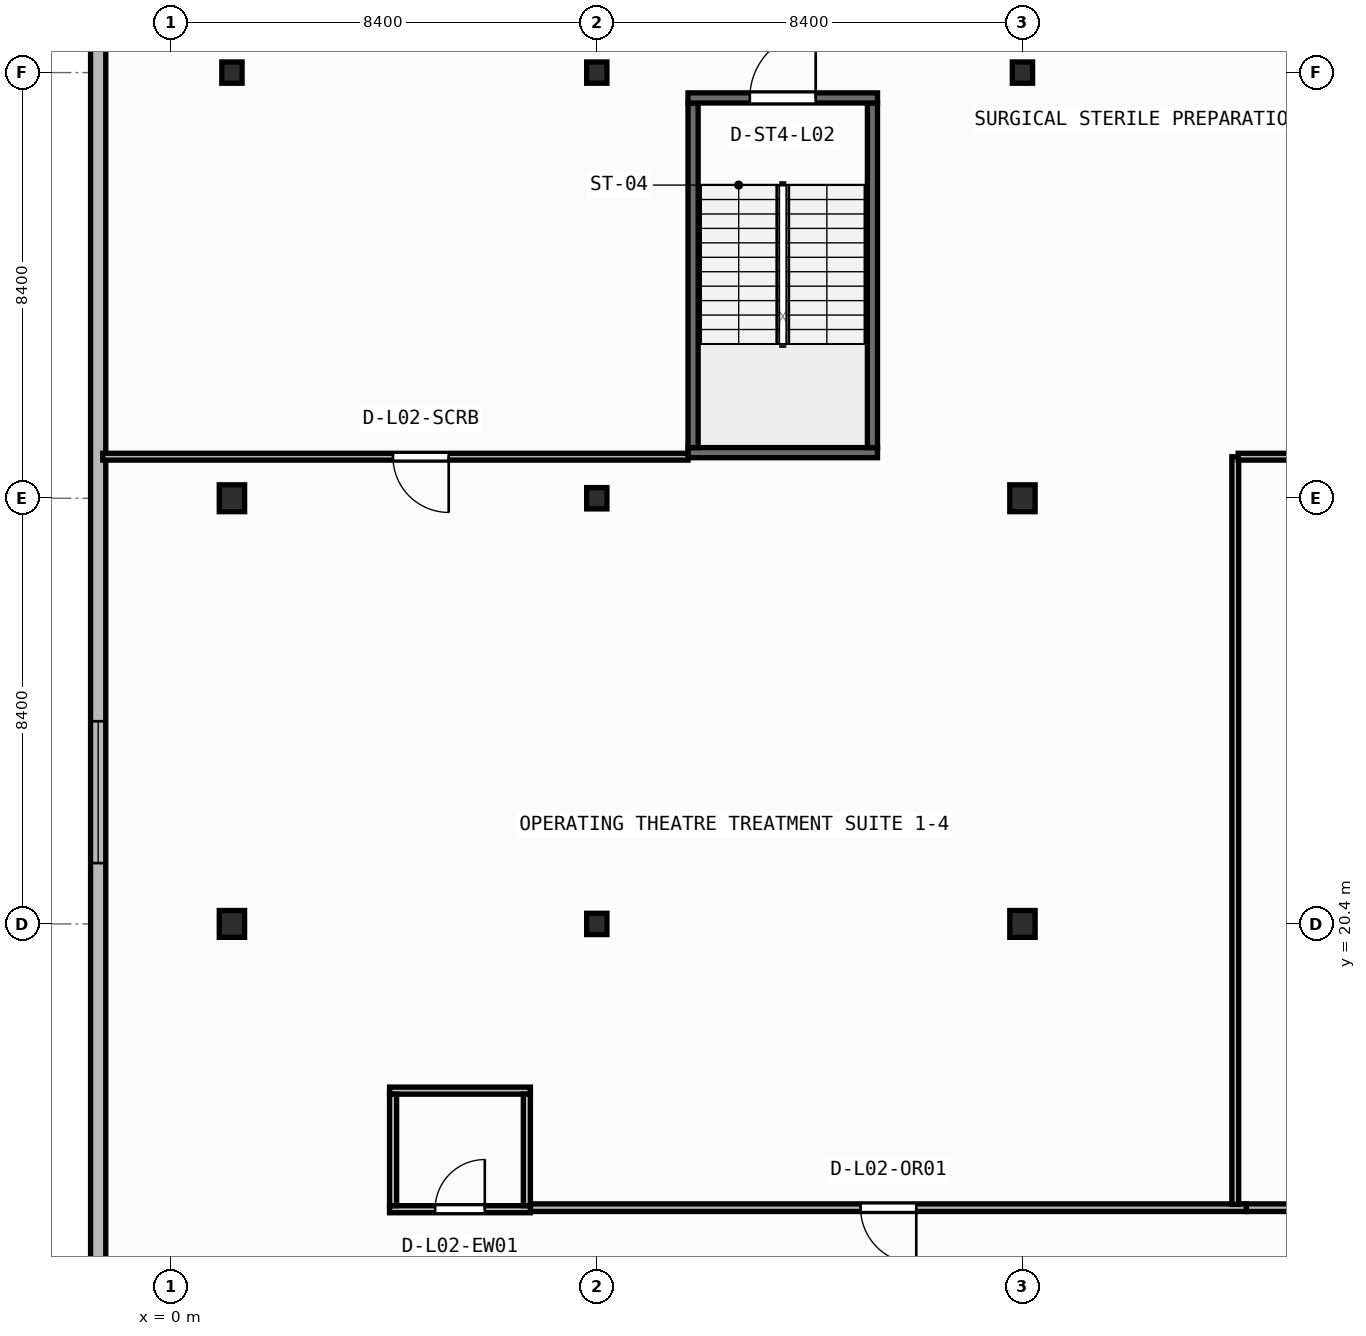
"""IFC4 building model, lengths in metres.
Left out: names, types, materials, properties, quantities, classifications, styles, units other than length and angle.
Written with IfcOpenShell. Run it as: python <this file> out.ifc"""

import sys

from ifc_helpers import new_model, si_unit, direction, frame, frame_2d, origin, origin_2d, place, context, subcontext, project, spatial, rectangle, i_section, extrude, element, fill, save


model = new_model("IFC4")
c1 = context("Model", 3, precision=1e-05, world=origin(), true_north=direction((0.0, 1.0)))
c2 = subcontext(c1, "Body", "Model", "MODEL_VIEW")
j1 = project(units=[si_unit("LENGTHUNIT", "METRE"), si_unit("PLANEANGLEUNIT", "RADIAN")], contexts=[c1])
p1 = place(None, origin())
s1 = spatial("IfcSite", under=j1, at=p1, CompositionType="ELEMENT")
p2 = place(p1, origin())
s2 = spatial("IfcBuilding", under=s1, at=p2, CompositionType="ELEMENT")
p3 = place(p2, frame((0.0, 0.0, 9.0)))
s3 = spatial("IfcBuildingStorey", under=s2, at=p3, CompositionType="ELEMENT", Elevation=9.0)
p4 = place(p3, frame((1.2, 20.4, 0.0), z_axis=(0.0, 0.0, 1.0), x_axis=(1.0, 0.0, 0.0)))
e1 = element("IfcColumn", 1, at=p4, inside=s3, PredefinedType="COLUMN", context=c2, shape_type="SweptSolid", body=[
    extrude(i_section(OverallWidth=0.5, OverallDepth=0.53, WebThickness=0.028, FlangeThickness=0.045, at=origin_2d()), origin(), (0.0, 0.0, 1.0), 4.5),
])
p5 = place(p3, frame((8.4, 20.4, 0.0), z_axis=(0.0, 0.0, 1.0), x_axis=(1.0, 0.0, 0.0)))
e2 = element("IfcColumn", 2, at=p5, inside=s3, PredefinedType="COLUMN", context=c2, shape_type="SweptSolid", body=[
    extrude(i_section(OverallWidth=0.4, OverallDepth=0.42, WebThickness=0.025, FlangeThickness=0.04, at=origin_2d()), origin(), (0.0, 0.0, 1.0), 4.5),
])
for number, where, z_axis, x_axis in (
    (3, (16.8, 20.4, 0.0), (0.0, 0.0, 1.0), (1.0, 0.0, 0.0)),
    (4, (1.2, 28.8, 0.0), (0.0, 0.0, 1.0), (1.0, 0.0, 0.0)),
):
    element("IfcColumn", number, at=place(p3, frame(where, z_axis=z_axis, x_axis=x_axis)), inside=s3, PredefinedType="COLUMN", context=c2, shape_type="SweptSolid", body=[
        extrude(i_section(OverallWidth=0.5, OverallDepth=0.53, WebThickness=0.028, FlangeThickness=0.045, at=origin_2d()), origin(), (0.0, 0.0, 1.0), 4.5),
    ])
p6 = place(p3, frame((8.4, 28.8, 0.0), z_axis=(0.0, 0.0, 1.0), x_axis=(1.0, 0.0, 0.0)))
e5 = element("IfcColumn", 5, at=p6, inside=s3, PredefinedType="COLUMN", context=c2, shape_type="SweptSolid", body=[
    extrude(i_section(OverallWidth=0.4, OverallDepth=0.42, WebThickness=0.025, FlangeThickness=0.04, at=origin_2d()), origin(), (0.0, 0.0, 1.0), 4.5),
])
p7 = place(p3, frame((16.8, 28.8, 0.0), z_axis=(0.0, 0.0, 1.0), x_axis=(1.0, 0.0, 0.0)))
e6 = element("IfcColumn", 6, at=p7, inside=s3, PredefinedType="COLUMN", context=c2, shape_type="SweptSolid", body=[
    extrude(i_section(OverallWidth=0.5, OverallDepth=0.53, WebThickness=0.028, FlangeThickness=0.045, at=origin_2d()), origin(), (0.0, 0.0, 1.0), 4.5),
])
for number, where, z_axis, x_axis in (
    (7, (1.2, 37.2, 0.0), (0.0, 0.0, 1.0), (1.0, 0.0, 0.0)),
    (8, (8.4, 37.2, 0.0), (0.0, 0.0, 1.0), (1.0, 0.0, 0.0)),
    (9, (16.8, 37.2, 0.0), (0.0, 0.0, 1.0), (1.0, 0.0, 0.0)),
):
    element("IfcColumn", number, at=place(p3, frame(where, z_axis=z_axis, x_axis=x_axis)), inside=s3, PredefinedType="COLUMN", context=c2, shape_type="SweptSolid", body=[
        extrude(i_section(OverallWidth=0.4, OverallDepth=0.42, WebThickness=0.025, FlangeThickness=0.04, at=origin_2d()), origin(), (0.0, 0.0, 1.0), 4.5),
    ])
p8 = place(p3, frame((-1.44, 45.24, 0.0), z_axis=(0.0, 0.0, 1.0), x_axis=(0.0, -1.0, 0.0)))
e10 = element("IfcWall", 10, at=p8, inside=s3, PredefinedType="STANDARD", context=c2, shape_type="SweptSolid", body=[
    extrude(rectangle(XDim=44.48, YDim=0.3, at=frame_2d((22.24, 0.0))), origin(), (0.0, 0.0, 1.0), 4.25),
])
p9 = place(p8, frame((20.84, 0.0, 0.85)))
e11 = element("IfcOpeningElement", 11, at=p9, cuts=e10, PredefinedType="OPENING", context=c2, shape_type="SweptSolid", body=[
    extrude(rectangle(XDim=2.8, YDim=2.1, at=frame_2d((1.4, 1.05))), frame((0.0, 0.16, 0.0), z_axis=(0.0, -1.0, 0.0), x_axis=(1.0, 0.0, 0.0)), (0.0, 0.0, 1.0), 0.32),
])
p10 = place(p3, frame((10.2, 29.7, 0.0), z_axis=(0.0, 0.0, 1.0), x_axis=(1.0, 0.0, 0.0)))
e12 = element("IfcWall", 12, at=p10, inside=s3, PredefinedType="SHEAR", context=c2, shape_type="SweptSolid", body=[
    extrude(rectangle(XDim=3.74, YDim=0.2, at=frame_2d((1.87, 0.0))), origin(), (0.0, 0.0, 1.0), 4.25),
])
for number, where, z_axis, x_axis in (
    (13, (10.3, 29.8, 0.0), (0.0, 0.0, 1.0), (0.0, 1.0, 0.0)),
    (14, (13.84, 29.8, 0.0), (0.0, 0.0, 1.0), (0.0, 1.0, 0.0)),
):
    element("IfcWall", number, at=place(p3, frame(where, z_axis=z_axis, x_axis=x_axis)), inside=s3, PredefinedType="SHEAR", context=c2, shape_type="SweptSolid", body=[
        extrude(rectangle(XDim=6.8, YDim=0.2, at=frame_2d((3.4, 0.0))), origin(), (0.0, 0.0, 1.0), 4.25),
    ])
p11 = place(p3, frame((10.2, 36.7, 0.0), z_axis=(0.0, 0.0, 1.0), x_axis=(1.0, 0.0, 0.0)))
e15 = element("IfcWall", 15, at=p11, inside=s3, PredefinedType="SHEAR", context=c2, shape_type="SweptSolid", body=[
    extrude(rectangle(XDim=3.74, YDim=0.2, at=frame_2d((1.87, 0.0))), origin(), (0.0, 0.0, 1.0), 4.25),
])
p12 = place(p11, frame((1.22, 0.0, 0.0)))
e16 = element("IfcOpeningElement", 16, at=p12, cuts=e15, PredefinedType="OPENING", context=c2, shape_type="SweptSolid", body=[
    extrude(rectangle(XDim=1.3, YDim=2.15, at=frame_2d((0.65, 1.075))), frame((0.0, 0.11, 0.0), z_axis=(0.0, -1.0, 0.0), x_axis=(1.0, 0.0, 0.0)), (0.0, 0.0, 1.0), 0.22),
])
p13 = place(p3, frame((4.31, 14.77, 0.0), z_axis=(0.0, 0.0, 1.0), x_axis=(1.0, 0.0, 0.0)))
e17 = element("IfcWall", 17, at=p13, inside=s3, PredefinedType="PARTITIONING", context=c2, shape_type="SweptSolid", body=[
    extrude(rectangle(XDim=2.78, YDim=0.14, at=frame_2d((1.39, 0.0))), origin(), (0.0, 0.0, 1.0), 4.25),
])
p14 = place(p13, frame((0.9, 0.0, 0.0)))
e18 = element("IfcOpeningElement", 18, at=p14, cuts=e17, PredefinedType="OPENING", context=c2, shape_type="SweptSolid", body=[
    extrude(rectangle(XDim=0.98, YDim=2.1, at=frame_2d((0.49, 1.05))), frame((0.0, 0.08, 0.0), z_axis=(0.0, -1.0, 0.0), x_axis=(1.0, 0.0, 0.0)), (0.0, 0.0, 1.0), 0.16),
])
p15 = place(p3, frame((4.31, 17.11, 0.0), z_axis=(0.0, 0.0, 1.0), x_axis=(1.0, 0.0, 0.0)))
e19 = element("IfcWall", 19, at=p15, inside=s3, PredefinedType="PARTITIONING", context=c2, shape_type="SweptSolid", body=[
    extrude(rectangle(XDim=2.78, YDim=0.14, at=frame_2d((1.39, 0.0))), origin(), (0.0, 0.0, 1.0), 4.25),
])
for number, where, z_axis, x_axis in (
    (20, (4.38, 14.84, 0.0), (0.0, 0.0, 1.0), (0.0, 1.0, 0.0)),
    (21, (7.02, 14.84, 0.0), (0.0, 0.0, 1.0), (0.0, 1.0, 0.0)),
):
    element("IfcWall", number, at=place(p3, frame(where, z_axis=z_axis, x_axis=x_axis)), inside=s3, PredefinedType="PARTITIONING", context=c2, shape_type="SweptSolid", body=[
        extrude(rectangle(XDim=2.2, YDim=0.14, at=frame_2d((1.1, 0.0))), origin(), (0.0, 0.0, 1.0), 4.25),
    ])
p16 = place(p3, frame((21.218, 14.8, 0.0), z_axis=(0.0, 0.0, 1.0), x_axis=(-1.0, 0.0, 0.0)))
e22 = element("IfcWall", 22, at=p16, inside=s3, PredefinedType="PARTITIONING", context=c2, shape_type="SweptSolid", body=[
    extrude(rectangle(XDim=14.126, YDim=0.15, at=frame_2d((7.063, 0.0))), origin(), (0.0, 0.0, 1.0), 4.25),
])
p17 = place(p16, frame((6.513, 0.0, 0.0)))
e23 = element("IfcOpeningElement", 23, at=p17, cuts=e22, PredefinedType="OPENING", context=c2, shape_type="SweptSolid", body=[
    extrude(rectangle(XDim=1.1, YDim=2.1, at=frame_2d((0.55, 1.05))), frame((0.0, 0.085, 0.0), z_axis=(0.0, -1.0, 0.0), x_axis=(1.0, 0.0, 0.0)), (0.0, 0.0, 1.0), 0.17),
])
p18 = place(p3, frame((44.218, 14.8, 0.0), z_axis=(0.0, 0.0, 1.0), x_axis=(-1.0, 0.0, 0.0)))
e24 = element("IfcWall", 24, at=p18, inside=s3, PredefinedType="PARTITIONING", context=c2, shape_type="SweptSolid", body=[
    extrude(rectangle(XDim=22.998, YDim=0.15, at=frame_2d((11.499, 0.0))), origin(), (0.0, 0.0, 1.0), 4.25),
])
p19 = place(p18, frame((10.949, 0.0, 0.0)))
e25 = element("IfcOpeningElement", 25, at=p19, cuts=e24, PredefinedType="OPENING", context=c2, shape_type="SweptSolid", body=[
    extrude(rectangle(XDim=1.1, YDim=2.1, at=frame_2d((0.55, 1.05))), frame((0.0, 0.085, 0.0), z_axis=(0.0, -1.0, 0.0), x_axis=(1.0, 0.0, 0.0)), (0.0, 0.0, 1.0), 0.17),
])
p20 = place(p3, frame((21.0, 14.865, 0.0), z_axis=(0.0, 0.0, 1.0), x_axis=(0.0, 1.0, 0.0)))
e26 = element("IfcWall", 26, at=p20, inside=s3, PredefinedType="PARTITIONING", context=c2, shape_type="SweptSolid", body=[
    extrude(rectangle(XDim=14.755, YDim=0.135, at=frame_2d((7.377, 0.0))), origin(), (0.0, 0.0, 1.0), 4.25),
])
p21 = place(p3, frame((10.2, 29.62, 0.0), z_axis=(0.0, 0.0, 1.0), x_axis=(-1.0, 0.0, 0.0)))
e27 = element("IfcWall", 27, at=p21, inside=s3, PredefinedType="PARTITIONING", context=c2, shape_type="SweptSolid", body=[
    extrude(rectangle(XDim=11.55, YDim=0.135, at=frame_2d((5.775, 0.0))), origin(), (0.0, 0.0, 1.0), 4.25),
])
p22 = place(p21, frame((4.722, 0.0, 0.0)))
e28 = element("IfcOpeningElement", 28, at=p22, cuts=e27, PredefinedType="OPENING", context=c2, shape_type="SweptSolid", body=[
    extrude(rectangle(XDim=1.1, YDim=2.1, at=frame_2d((0.55, 1.05))), frame((0.0, 0.077, 0.0), z_axis=(0.0, -1.0, 0.0), x_axis=(1.0, 0.0, 0.0)), (0.0, 0.0, 1.0), 0.155),
])
p23 = place(p3, frame((33.657, 29.62, 0.0), z_axis=(0.0, 0.0, 1.0), x_axis=(-1.0, 0.0, 0.0)))
e29 = element("IfcWall", 29, at=p23, inside=s3, PredefinedType="PARTITIONING", context=c2, shape_type="SweptSolid", body=[
    extrude(rectangle(XDim=12.6, YDim=0.135, at=frame_2d((6.3, 0.0))), origin(), (0.0, 0.0, 1.0), 4.25),
])
p24 = place(p9, origin())
e30 = element("IfcWindow", 30, at=p24, inside=s3, PartitioningType="SINGLE_PANEL", PredefinedType="WINDOW", context=c2, shape_type="SweptSolid", body=[
    extrude(rectangle(XDim=2.8, YDim=2.1, at=frame_2d((1.4, 1.05))), frame((0.0, 0.03, 0.0), z_axis=(0.0, -1.0, 0.0), x_axis=(1.0, 0.0, 0.0)), (0.0, 0.0, 1.0), 0.06),
])
fill(e11, e30)
p25 = place(p12, origin())
e31 = element("IfcDoor", 31, at=p25, inside=s3, OperationType="SINGLE_SWING_RIGHT", PredefinedType="DOOR", context=c2, shape_type="SweptSolid", body=[
    extrude(rectangle(XDim=1.3, YDim=2.15, at=frame_2d((0.65, 1.075))), frame((0.0, 0.025, 0.0), z_axis=(0.0, -1.0, 0.0), x_axis=(1.0, 0.0, 0.0)), (0.0, 0.0, 1.0), 0.05),
])
fill(e16, e31)
p26 = place(p14, origin())
e32 = element("IfcDoor", 32, at=p26, inside=s3, OperationType="SINGLE_SWING_RIGHT", PredefinedType="DOOR", context=c2, shape_type="SweptSolid", body=[
    extrude(rectangle(XDim=0.98, YDim=2.1, at=frame_2d((0.49, 1.05))), frame((0.0, 0.025, 0.0), z_axis=(0.0, -1.0, 0.0), x_axis=(1.0, 0.0, 0.0)), (0.0, 0.0, 1.0), 0.05),
])
fill(e18, e32)
p27 = place(p17, origin())
e33 = element("IfcDoor", 33, at=p27, inside=s3, OperationType="SINGLE_SWING_LEFT", PredefinedType="DOOR", context=c2, shape_type="SweptSolid", body=[
    extrude(rectangle(XDim=1.1, YDim=2.1, at=frame_2d((0.55, 1.05))), frame((0.0, 0.025, 0.0), z_axis=(0.0, -1.0, 0.0), x_axis=(1.0, 0.0, 0.0)), (0.0, 0.0, 1.0), 0.05),
])
fill(e23, e33)
p28 = place(p22, origin())
e34 = element("IfcDoor", 34, at=p28, inside=s3, OperationType="SINGLE_SWING_LEFT", PredefinedType="DOOR", context=c2, shape_type="SweptSolid", body=[
    extrude(rectangle(XDim=1.1, YDim=2.1, at=frame_2d((0.55, 1.05))), frame((0.0, 0.025, 0.0), z_axis=(0.0, -1.0, 0.0), x_axis=(1.0, 0.0, 0.0)), (0.0, 0.0, 1.0), 0.05),
])
fill(e28, e34)
save(model, sys.argv[1])
